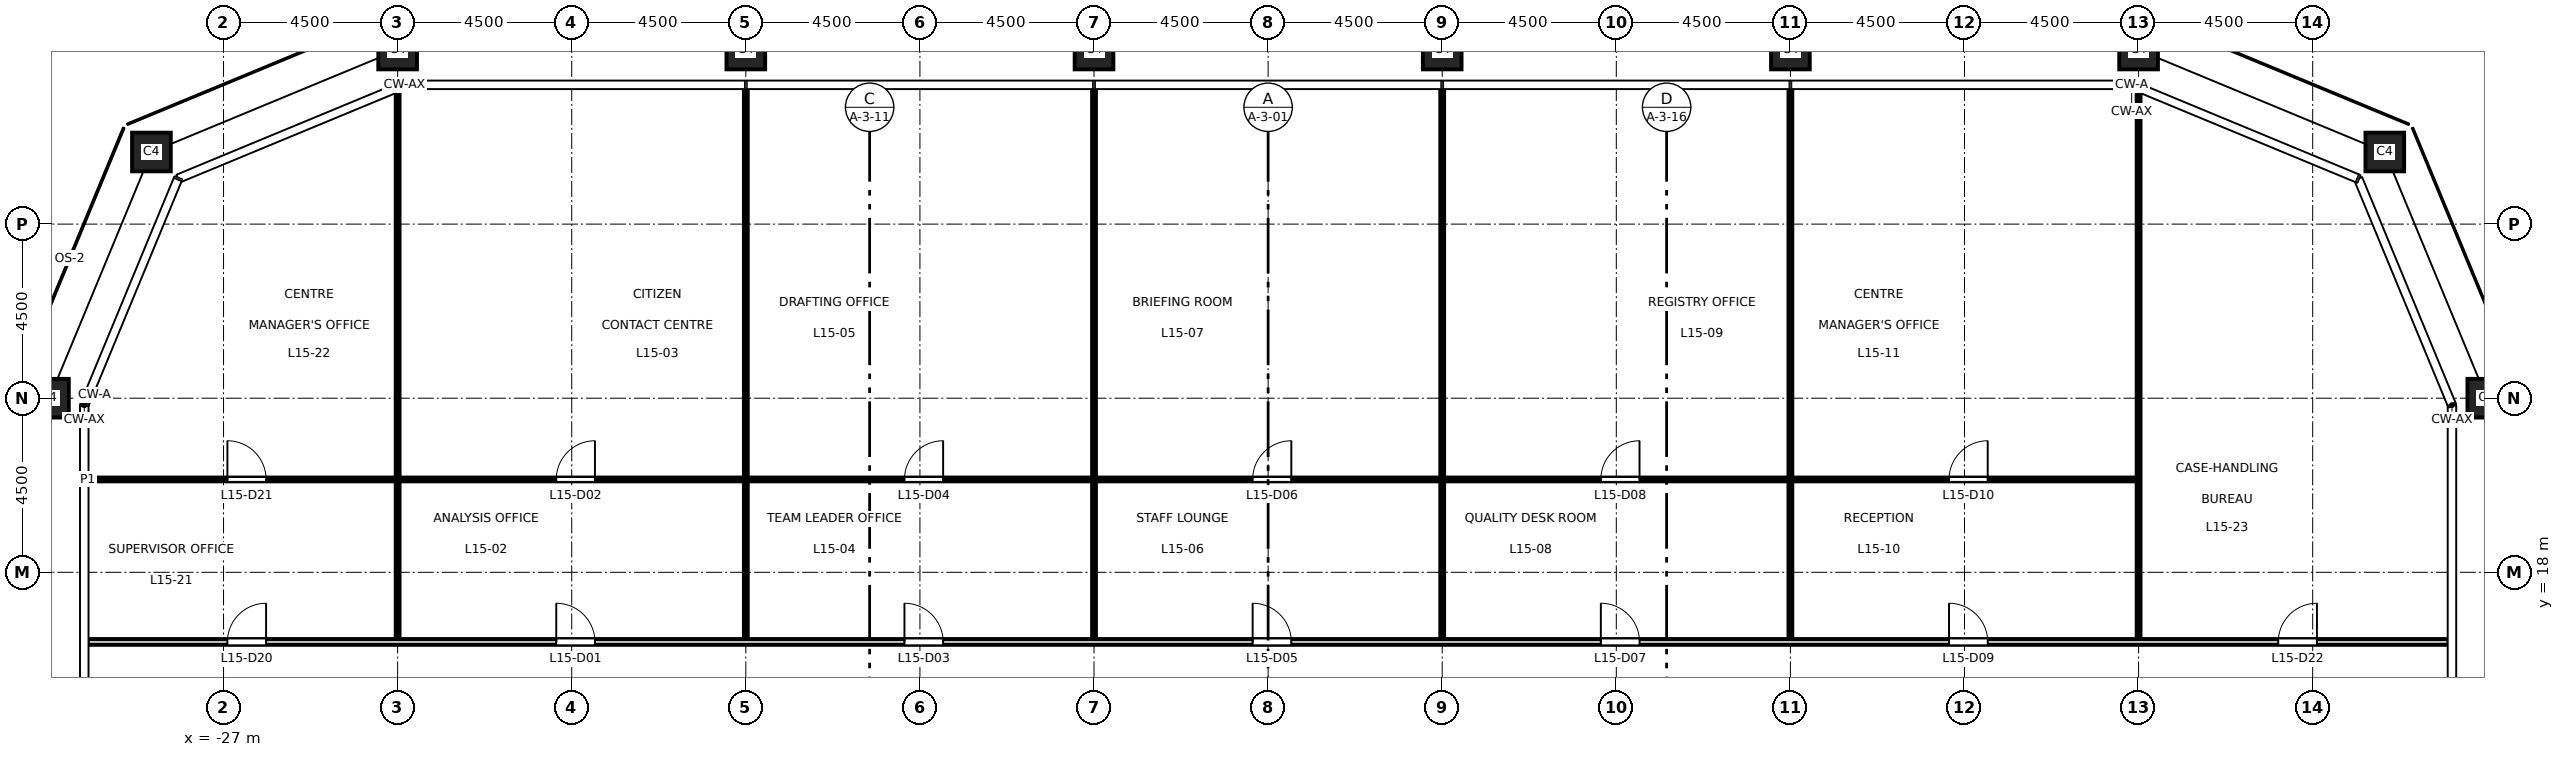
"""IFC4 building model, lengths in metres.
Left out: names, types, materials, properties, quantities, classifications, styles, units other than length and angle.
Written with IfcOpenShell. Run it as: python <this file> out.ifc"""

import sys

from ifc_helpers import new_model, si_unit, direction, frame, frame_2d, origin, origin_2d, place, context, subcontext, project, spatial, rectangle, hollow_rectangle, extrude, element, fill, save


model = new_model("IFC4")
c1 = context("Model", 3, precision=1e-05, world=origin(), true_north=direction((0.0, 1.0)))
c2 = subcontext(c1, "Body", "Model", "MODEL_VIEW")
j1 = project(units=[si_unit("LENGTHUNIT", "METRE"), si_unit("PLANEANGLEUNIT", "RADIAN")], contexts=[c1])
p1 = place(None, origin())
s1 = spatial("IfcSite", under=j1, at=p1, CompositionType="ELEMENT")
p2 = place(p1, origin())
s2 = spatial("IfcBuilding", under=s1, at=p2, CompositionType="ELEMENT")
p3 = place(p2, frame((0.0, 0.0, 71.7)))
s3 = spatial("IfcBuildingStorey", under=s2, at=p3, CompositionType="ELEMENT", Elevation=71.7)
for number, where, z_axis, x_axis in (
    (1, (31.5, 22.5, 0.0), (0.0, 0.0, 1.0), (1.0, 0.0, 0.0)),
    (2, (28.864, 28.864, 0.0), (0.0, 0.0, 1.0), (1.0, 0.0, 0.0)),
    (3, (22.5, 31.5, 0.0), (0.0, 0.0, 1.0), (1.0, 0.0, 0.0)),
    (4, (13.5, 31.5, 0.0), (0.0, 0.0, 1.0), (1.0, 0.0, 0.0)),
    (5, (4.5, 31.5, 0.0), (0.0, 0.0, 1.0), (1.0, 0.0, 0.0)),
    (6, (-4.5, 31.5, 0.0), (0.0, 0.0, 1.0), (1.0, 0.0, 0.0)),
    (7, (-13.5, 31.5, 0.0), (0.0, 0.0, 1.0), (1.0, 0.0, 0.0)),
    (8, (-22.5, 31.5, 0.0), (0.0, 0.0, 1.0), (1.0, 0.0, 0.0)),
    (9, (-28.864, 28.864, 0.0), (0.0, 0.0, 1.0), (1.0, 0.0, 0.0)),
    (10, (-31.5, 22.5, 0.0), (0.0, 0.0, 1.0), (1.0, 0.0, 0.0)),
):
    element("IfcColumn", number, at=place(p3, frame(where, z_axis=z_axis, x_axis=x_axis)), inside=s3, PredefinedType="COLUMN", context=c2, shape_type="SweptSolid", body=[
        extrude(hollow_rectangle(XDim=1.0, YDim=1.0, WallThickness=0.06, at=origin_2d()), origin(), (0.0, 0.0, 1.0), 4.5),
    ])
p4 = place(p3, frame((-30.51, 16.2, 0.0), z_axis=(0.0, 0.0, 1.0), x_axis=(1.0, 0.0, 0.0)))
e11 = element("IfcWall", 11, at=p4, inside=s3, PredefinedType="PARTITIONING", context=c2, shape_type="SweptSolid", body=[
    extrude(rectangle(XDim=61.02, YDim=0.15, at=frame_2d((30.51, 0.0))), origin(), (0.0, 0.0, 1.0), 4.35),
])
p5 = place(p4, frame((12.11, 0.0, 0.0)))
e12 = element("IfcOpeningElement", 12, at=p5, cuts=e11, PredefinedType="OPENING", context=c2, shape_type="SweptSolid", body=[
    extrude(rectangle(XDim=1.0, YDim=2.1, at=frame_2d((0.5, 1.05))), frame((0.0, 0.085, 0.0), z_axis=(0.0, -1.0, 0.0), x_axis=(1.0, 0.0, 0.0)), (0.0, 0.0, 1.0), 0.17),
])
p6 = place(p4, frame((21.11, 0.0, 0.0)))
e13 = element("IfcOpeningElement", 13, at=p6, cuts=e11, PredefinedType="OPENING", context=c2, shape_type="SweptSolid", body=[
    extrude(rectangle(XDim=1.0, YDim=2.1, at=frame_2d((0.5, 1.05))), frame((0.0, 0.085, 0.0), z_axis=(0.0, -1.0, 0.0), x_axis=(1.0, 0.0, 0.0)), (0.0, 0.0, 1.0), 0.17),
])
p7 = place(p4, frame((30.11, 0.0, 0.0)))
e14 = element("IfcOpeningElement", 14, at=p7, cuts=e11, PredefinedType="OPENING", context=c2, shape_type="SweptSolid", body=[
    extrude(rectangle(XDim=1.0, YDim=2.1, at=frame_2d((0.5, 1.05))), frame((0.0, 0.085, 0.0), z_axis=(0.0, -1.0, 0.0), x_axis=(1.0, 0.0, 0.0)), (0.0, 0.0, 1.0), 0.17),
])
p8 = place(p4, frame((39.11, 0.0, 0.0)))
e15 = element("IfcOpeningElement", 15, at=p8, cuts=e11, PredefinedType="OPENING", context=c2, shape_type="SweptSolid", body=[
    extrude(rectangle(XDim=1.0, YDim=2.1, at=frame_2d((0.5, 1.05))), frame((0.0, 0.085, 0.0), z_axis=(0.0, -1.0, 0.0), x_axis=(1.0, 0.0, 0.0)), (0.0, 0.0, 1.0), 0.17),
])
p9 = place(p4, frame((48.11, 0.0, 0.0)))
e16 = element("IfcOpeningElement", 16, at=p9, cuts=e11, PredefinedType="OPENING", context=c2, shape_type="SweptSolid", body=[
    extrude(rectangle(XDim=1.0, YDim=2.1, at=frame_2d((0.5, 1.05))), frame((0.0, 0.085, 0.0), z_axis=(0.0, -1.0, 0.0), x_axis=(1.0, 0.0, 0.0)), (0.0, 0.0, 1.0), 0.17),
])
p10 = place(p4, frame((3.61, 0.0, 0.0)))
e17 = element("IfcOpeningElement", 17, at=p10, cuts=e11, PredefinedType="OPENING", context=c2, shape_type="SweptSolid", body=[
    extrude(rectangle(XDim=1.0, YDim=2.1, at=frame_2d((0.5, 1.05))), frame((0.0, 0.085, 0.0), z_axis=(0.0, -1.0, 0.0), x_axis=(1.0, 0.0, 0.0)), (0.0, 0.0, 1.0), 0.17),
])
p11 = place(p4, frame((56.62, 0.0, 0.0)))
e18 = element("IfcOpeningElement", 18, at=p11, cuts=e11, PredefinedType="OPENING", context=c2, shape_type="SweptSolid", body=[
    extrude(rectangle(XDim=1.0, YDim=2.1, at=frame_2d((0.5, 1.05))), frame((0.0, 0.085, 0.0), z_axis=(0.0, -1.0, 0.0), x_axis=(1.0, 0.0, 0.0)), (0.0, 0.0, 1.0), 0.17),
])
p12 = place(p3, frame((-30.51, 20.4, 0.0), z_axis=(0.0, 0.0, 1.0), x_axis=(1.0, 0.0, 0.0)))
e19 = element("IfcWall", 19, at=p12, inside=s3, PredefinedType="PARTITIONING", context=c2, shape_type="SweptSolid", body=[
    extrude(rectangle(XDim=52.96, YDim=0.1, at=frame_2d((26.48, 0.0))), origin(), (0.0, 0.0, 1.0), 4.35),
])
p13 = place(p12, frame((12.11, 0.0, 0.0)))
e20 = element("IfcOpeningElement", 20, at=p13, cuts=e19, PredefinedType="OPENING", context=c2, shape_type="SweptSolid", body=[
    extrude(rectangle(XDim=1.0, YDim=2.1, at=frame_2d((0.5, 1.05))), frame((0.0, 0.06, 0.0), z_axis=(0.0, -1.0, 0.0), x_axis=(1.0, 0.0, 0.0)), (0.0, 0.0, 1.0), 0.12),
])
p14 = place(p12, frame((21.11, 0.0, 0.0)))
e21 = element("IfcOpeningElement", 21, at=p14, cuts=e19, PredefinedType="OPENING", context=c2, shape_type="SweptSolid", body=[
    extrude(rectangle(XDim=1.0, YDim=2.1, at=frame_2d((0.5, 1.05))), frame((0.0, 0.06, 0.0), z_axis=(0.0, -1.0, 0.0), x_axis=(1.0, 0.0, 0.0)), (0.0, 0.0, 1.0), 0.12),
])
p15 = place(p12, frame((30.11, 0.0, 0.0)))
e22 = element("IfcOpeningElement", 22, at=p15, cuts=e19, PredefinedType="OPENING", context=c2, shape_type="SweptSolid", body=[
    extrude(rectangle(XDim=1.0, YDim=2.1, at=frame_2d((0.5, 1.05))), frame((0.0, 0.06, 0.0), z_axis=(0.0, -1.0, 0.0), x_axis=(1.0, 0.0, 0.0)), (0.0, 0.0, 1.0), 0.12),
])
p16 = place(p12, frame((39.11, 0.0, 0.0)))
e23 = element("IfcOpeningElement", 23, at=p16, cuts=e19, PredefinedType="OPENING", context=c2, shape_type="SweptSolid", body=[
    extrude(rectangle(XDim=1.0, YDim=2.1, at=frame_2d((0.5, 1.05))), frame((0.0, 0.06, 0.0), z_axis=(0.0, -1.0, 0.0), x_axis=(1.0, 0.0, 0.0)), (0.0, 0.0, 1.0), 0.12),
])
p17 = place(p12, frame((48.11, 0.0, 0.0)))
e24 = element("IfcOpeningElement", 24, at=p17, cuts=e19, PredefinedType="OPENING", context=c2, shape_type="SweptSolid", body=[
    extrude(rectangle(XDim=1.0, YDim=2.1, at=frame_2d((0.5, 1.05))), frame((0.0, 0.06, 0.0), z_axis=(0.0, -1.0, 0.0), x_axis=(1.0, 0.0, 0.0)), (0.0, 0.0, 1.0), 0.12),
])
p18 = place(p12, frame((3.61, 0.0, 0.0)))
e25 = element("IfcOpeningElement", 25, at=p18, cuts=e19, PredefinedType="OPENING", context=c2, shape_type="SweptSolid", body=[
    extrude(rectangle(XDim=1.0, YDim=2.1, at=frame_2d((0.5, 1.05))), frame((0.0, 0.06, 0.0), z_axis=(0.0, -1.0, 0.0), x_axis=(1.0, 0.0, 0.0)), (0.0, 0.0, 1.0), 0.12),
])
p19 = place(p3, frame((-22.5, 16.275, 0.0), z_axis=(0.0, 0.0, 1.0), x_axis=(0.0, 1.0, 0.0)))
e26 = element("IfcWall", 26, at=p19, inside=s3, PredefinedType="PARTITIONING", context=c2, shape_type="SweptSolid", body=[
    extrude(rectangle(XDim=4.075, YDim=0.1, at=frame_2d((2.038, 0.0))), origin(), (0.0, 0.0, 1.0), 3.35),
])
p20 = place(p3, frame((-22.5, 20.45, 0.0), z_axis=(0.0, 0.0, 1.0), x_axis=(0.0, 1.0, 0.0)))
e27 = element("IfcWall", 27, at=p20, inside=s3, PredefinedType="PARTITIONING", context=c2, shape_type="SweptSolid", body=[
    extrude(rectangle(XDim=9.978, YDim=0.1, at=frame_2d((4.989, 0.0))), origin(), (0.0, 0.0, 1.0), 3.35),
])
p21 = place(p3, frame((-13.5, 16.275, 0.0), z_axis=(0.0, 0.0, 1.0), x_axis=(0.0, 1.0, 0.0)))
e28 = element("IfcWall", 28, at=p21, inside=s3, PredefinedType="PARTITIONING", context=c2, shape_type="SweptSolid", body=[
    extrude(rectangle(XDim=4.075, YDim=0.1, at=frame_2d((2.038, 0.0))), origin(), (0.0, 0.0, 1.0), 3.35),
])
p22 = place(p3, frame((-13.5, 20.45, 0.0), z_axis=(0.0, 0.0, 1.0), x_axis=(0.0, 1.0, 0.0)))
e29 = element("IfcWall", 29, at=p22, inside=s3, PredefinedType="PARTITIONING", context=c2, shape_type="SweptSolid", body=[
    extrude(rectangle(XDim=10.06, YDim=0.1, at=frame_2d((5.03, 0.0))), origin(), (0.0, 0.0, 1.0), 3.35),
])
p23 = place(p3, frame((-4.5, 16.275, 0.0), z_axis=(0.0, 0.0, 1.0), x_axis=(0.0, 1.0, 0.0)))
e30 = element("IfcWall", 30, at=p23, inside=s3, PredefinedType="PARTITIONING", context=c2, shape_type="SweptSolid", body=[
    extrude(rectangle(XDim=4.075, YDim=0.1, at=frame_2d((2.038, 0.0))), origin(), (0.0, 0.0, 1.0), 3.35),
])
p24 = place(p3, frame((-4.5, 20.45, 0.0), z_axis=(0.0, 0.0, 1.0), x_axis=(0.0, 1.0, 0.0)))
e31 = element("IfcWall", 31, at=p24, inside=s3, PredefinedType="PARTITIONING", context=c2, shape_type="SweptSolid", body=[
    extrude(rectangle(XDim=10.06, YDim=0.1, at=frame_2d((5.03, 0.0))), origin(), (0.0, 0.0, 1.0), 3.35),
])
p25 = place(p3, frame((4.5, 16.275, 0.0), z_axis=(0.0, 0.0, 1.0), x_axis=(0.0, 1.0, 0.0)))
e32 = element("IfcWall", 32, at=p25, inside=s3, PredefinedType="PARTITIONING", context=c2, shape_type="SweptSolid", body=[
    extrude(rectangle(XDim=4.075, YDim=0.1, at=frame_2d((2.038, 0.0))), origin(), (0.0, 0.0, 1.0), 3.35),
])
p26 = place(p3, frame((4.5, 20.45, 0.0), z_axis=(0.0, 0.0, 1.0), x_axis=(0.0, 1.0, 0.0)))
e33 = element("IfcWall", 33, at=p26, inside=s3, PredefinedType="PARTITIONING", context=c2, shape_type="SweptSolid", body=[
    extrude(rectangle(XDim=10.06, YDim=0.1, at=frame_2d((5.03, 0.0))), origin(), (0.0, 0.0, 1.0), 3.35),
])
p27 = place(p3, frame((13.5, 16.275, 0.0), z_axis=(0.0, 0.0, 1.0), x_axis=(0.0, 1.0, 0.0)))
e34 = element("IfcWall", 34, at=p27, inside=s3, PredefinedType="PARTITIONING", context=c2, shape_type="SweptSolid", body=[
    extrude(rectangle(XDim=4.075, YDim=0.1, at=frame_2d((2.038, 0.0))), origin(), (0.0, 0.0, 1.0), 3.35),
])
p28 = place(p3, frame((13.5, 20.45, 0.0), z_axis=(0.0, 0.0, 1.0), x_axis=(0.0, 1.0, 0.0)))
e35 = element("IfcWall", 35, at=p28, inside=s3, PredefinedType="PARTITIONING", context=c2, shape_type="SweptSolid", body=[
    extrude(rectangle(XDim=10.06, YDim=0.1, at=frame_2d((5.03, 0.0))), origin(), (0.0, 0.0, 1.0), 3.35),
])
p29 = place(p3, frame((22.5, 16.275, 0.0), z_axis=(0.0, 0.0, 1.0), x_axis=(0.0, 1.0, 0.0)))
e36 = element("IfcWall", 36, at=p29, inside=s3, PredefinedType="PARTITIONING", context=c2, shape_type="SweptSolid", body=[
    extrude(rectangle(XDim=14.153, YDim=0.1, at=frame_2d((7.077, 0.0))), origin(), (0.0, 0.0, 1.0), 3.35),
])
p30 = place(p5, origin())
e37 = element("IfcDoor", 37, at=p30, inside=s3, OperationType="SINGLE_SWING_LEFT", PredefinedType="DOOR", context=c2, shape_type="SweptSolid", body=[
    extrude(rectangle(XDim=1.0, YDim=2.1, at=frame_2d((0.5, 1.05))), frame((0.0, 0.025, 0.0), z_axis=(0.0, -1.0, 0.0), x_axis=(1.0, 0.0, 0.0)), (0.0, 0.0, 1.0), 0.05),
])
fill(e12, e37)
p31 = place(p13, origin())
e38 = element("IfcDoor", 38, at=p31, inside=s3, OperationType="SINGLE_SWING_RIGHT", PredefinedType="DOOR", context=c2, shape_type="SweptSolid", body=[
    extrude(rectangle(XDim=1.0, YDim=2.1, at=frame_2d((0.5, 1.05))), frame((0.0, 0.025, 0.0), z_axis=(0.0, -1.0, 0.0), x_axis=(1.0, 0.0, 0.0)), (0.0, 0.0, 1.0), 0.05),
])
fill(e20, e38)
p32 = place(p6, origin())
e39 = element("IfcDoor", 39, at=p32, inside=s3, OperationType="SINGLE_SWING_LEFT", PredefinedType="DOOR", context=c2, shape_type="SweptSolid", body=[
    extrude(rectangle(XDim=1.0, YDim=2.1, at=frame_2d((0.5, 1.05))), frame((0.0, 0.025, 0.0), z_axis=(0.0, -1.0, 0.0), x_axis=(1.0, 0.0, 0.0)), (0.0, 0.0, 1.0), 0.05),
])
fill(e13, e39)
p33 = place(p14, origin())
e40 = element("IfcDoor", 40, at=p33, inside=s3, OperationType="SINGLE_SWING_RIGHT", PredefinedType="DOOR", context=c2, shape_type="SweptSolid", body=[
    extrude(rectangle(XDim=1.0, YDim=2.1, at=frame_2d((0.5, 1.05))), frame((0.0, 0.025, 0.0), z_axis=(0.0, -1.0, 0.0), x_axis=(1.0, 0.0, 0.0)), (0.0, 0.0, 1.0), 0.05),
])
fill(e21, e40)
p34 = place(p7, origin())
e41 = element("IfcDoor", 41, at=p34, inside=s3, OperationType="SINGLE_SWING_LEFT", PredefinedType="DOOR", context=c2, shape_type="SweptSolid", body=[
    extrude(rectangle(XDim=1.0, YDim=2.1, at=frame_2d((0.5, 1.05))), frame((0.0, 0.025, 0.0), z_axis=(0.0, -1.0, 0.0), x_axis=(1.0, 0.0, 0.0)), (0.0, 0.0, 1.0), 0.05),
])
fill(e14, e41)
p35 = place(p15, origin())
e42 = element("IfcDoor", 42, at=p35, inside=s3, OperationType="SINGLE_SWING_RIGHT", PredefinedType="DOOR", context=c2, shape_type="SweptSolid", body=[
    extrude(rectangle(XDim=1.0, YDim=2.1, at=frame_2d((0.5, 1.05))), frame((0.0, 0.025, 0.0), z_axis=(0.0, -1.0, 0.0), x_axis=(1.0, 0.0, 0.0)), (0.0, 0.0, 1.0), 0.05),
])
fill(e22, e42)
p36 = place(p8, origin())
e43 = element("IfcDoor", 43, at=p36, inside=s3, OperationType="SINGLE_SWING_LEFT", PredefinedType="DOOR", context=c2, shape_type="SweptSolid", body=[
    extrude(rectangle(XDim=1.0, YDim=2.1, at=frame_2d((0.5, 1.05))), frame((0.0, 0.025, 0.0), z_axis=(0.0, -1.0, 0.0), x_axis=(1.0, 0.0, 0.0)), (0.0, 0.0, 1.0), 0.05),
])
fill(e15, e43)
p37 = place(p16, origin())
e44 = element("IfcDoor", 44, at=p37, inside=s3, OperationType="SINGLE_SWING_RIGHT", PredefinedType="DOOR", context=c2, shape_type="SweptSolid", body=[
    extrude(rectangle(XDim=1.0, YDim=2.1, at=frame_2d((0.5, 1.05))), frame((0.0, 0.025, 0.0), z_axis=(0.0, -1.0, 0.0), x_axis=(1.0, 0.0, 0.0)), (0.0, 0.0, 1.0), 0.05),
])
fill(e23, e44)
p38 = place(p9, origin())
e45 = element("IfcDoor", 45, at=p38, inside=s3, OperationType="SINGLE_SWING_LEFT", PredefinedType="DOOR", context=c2, shape_type="SweptSolid", body=[
    extrude(rectangle(XDim=1.0, YDim=2.1, at=frame_2d((0.5, 1.05))), frame((0.0, 0.025, 0.0), z_axis=(0.0, -1.0, 0.0), x_axis=(1.0, 0.0, 0.0)), (0.0, 0.0, 1.0), 0.05),
])
fill(e16, e45)
p39 = place(p17, origin())
e46 = element("IfcDoor", 46, at=p39, inside=s3, OperationType="SINGLE_SWING_RIGHT", PredefinedType="DOOR", context=c2, shape_type="SweptSolid", body=[
    extrude(rectangle(XDim=1.0, YDim=2.1, at=frame_2d((0.5, 1.05))), frame((0.0, 0.025, 0.0), z_axis=(0.0, -1.0, 0.0), x_axis=(1.0, 0.0, 0.0)), (0.0, 0.0, 1.0), 0.05),
])
fill(e24, e46)
p40 = place(p10, origin())
e47 = element("IfcDoor", 47, at=p40, inside=s3, OperationType="SINGLE_SWING_RIGHT", PredefinedType="DOOR", context=c2, shape_type="SweptSolid", body=[
    extrude(rectangle(XDim=1.0, YDim=2.1, at=frame_2d((0.5, 1.05))), frame((0.0, 0.025, 0.0), z_axis=(0.0, -1.0, 0.0), x_axis=(1.0, 0.0, 0.0)), (0.0, 0.0, 1.0), 0.05),
])
fill(e17, e47)
p41 = place(p18, origin())
e48 = element("IfcDoor", 48, at=p41, inside=s3, OperationType="SINGLE_SWING_LEFT", PredefinedType="DOOR", context=c2, shape_type="SweptSolid", body=[
    extrude(rectangle(XDim=1.0, YDim=2.1, at=frame_2d((0.5, 1.05))), frame((0.0, 0.025, 0.0), z_axis=(0.0, -1.0, 0.0), x_axis=(1.0, 0.0, 0.0)), (0.0, 0.0, 1.0), 0.05),
])
fill(e25, e48)
p42 = place(p11, origin())
e49 = element("IfcDoor", 49, at=p42, inside=s3, OperationType="SINGLE_SWING_RIGHT", PredefinedType="DOOR", context=c2, shape_type="SweptSolid", body=[
    extrude(rectangle(XDim=1.0, YDim=2.1, at=frame_2d((0.5, 1.05))), frame((0.0, 0.025, 0.0), z_axis=(0.0, -1.0, 0.0), x_axis=(1.0, 0.0, 0.0)), (0.0, 0.0, 1.0), 0.05),
])
fill(e18, e49)
save(model, sys.argv[1])
